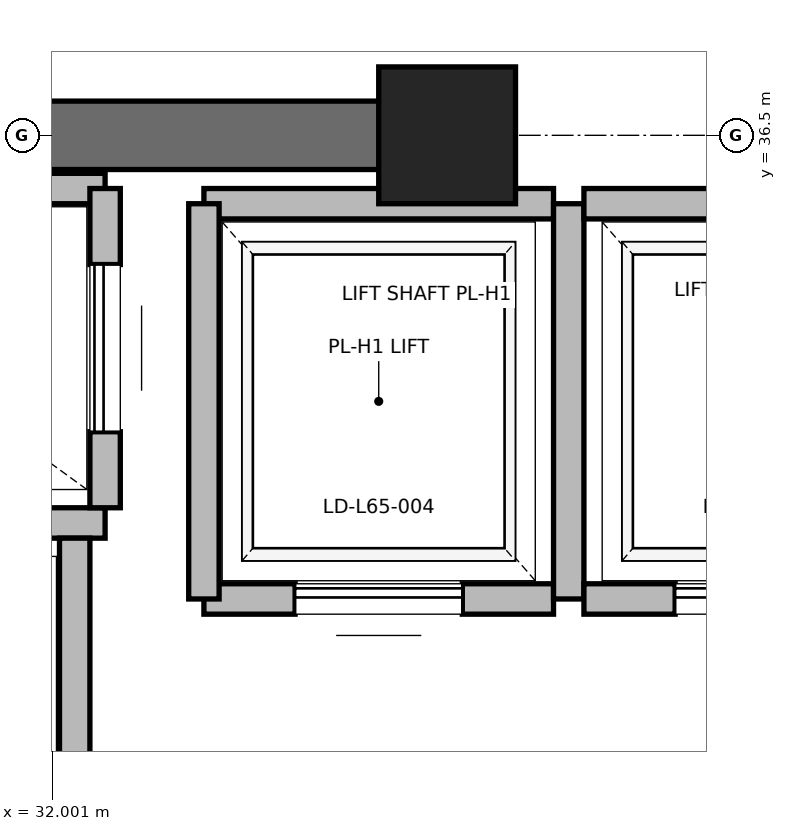
"""IFC4 building model, lengths in metres.
Left out: names, types, materials, properties, quantities, classifications, styles, units other than length and angle.
Written with IfcOpenShell. Run it as: python <this file> out.ifc"""

import sys

from ifc_helpers import new_model, si_unit, direction, frame, frame_2d, origin, origin_2d, place, context, subcontext, project, spatial, rectangle, extrude, element, fill, save


model = new_model("IFC4")
c1 = context("Model", 3, precision=1e-05, world=origin(), true_north=direction((0.0, 1.0)))
c2 = subcontext(c1, "Body", "Model", "MODEL_VIEW")
j1 = project(units=[si_unit("LENGTHUNIT", "METRE"), si_unit("PLANEANGLEUNIT", "RADIAN")], contexts=[c1])
p1 = place(None, origin())
s1 = spatial("IfcSite", under=j1, at=p1, CompositionType="ELEMENT")
p2 = place(p1, origin())
s2 = spatial("IfcBuilding", under=s1, at=p2, CompositionType="ELEMENT")
p3 = place(p2, frame((0.0, 0.0, 279.2)))
s3 = spatial("IfcBuildingStorey", under=s2, at=p3, CompositionType="ELEMENT", Elevation=279.2)
p4 = place(p3, frame((34.6, 36.5, 0.0), z_axis=(0.0, 0.0, 1.0), x_axis=(1.0, 0.0, 0.0)))
e1 = element("IfcColumn", 1, at=p4, inside=s3, PredefinedType="PILASTER", context=c2, shape_type="SweptSolid", body=[
    extrude(rectangle(XDim=0.9, YDim=0.9, at=origin_2d()), origin(), (0.0, 0.0, 1.0), 4.0),
])
p5 = place(p3, frame((29.0, 36.5, 0.0), z_axis=(0.0, 0.0, 1.0), x_axis=(1.0, 0.0, 0.0)))
e2 = element("IfcWall", 2, at=p5, inside=s3, PredefinedType="SHEAR", context=c2, shape_type="SweptSolid", body=[
    extrude(rectangle(XDim=5.8, YDim=0.45, at=frame_2d((2.9, 0.0))), origin(), (0.0, 0.0, 1.0), 3.785),
])
p6 = place(p3, frame((29.55, 33.95, 0.0), z_axis=(0.0, 0.0, 1.0), x_axis=(1.0, 0.0, 0.0)))
e3 = element("IfcWall", 3, at=p6, inside=s3, PredefinedType="SOLIDWALL", context=c2, shape_type="SweptSolid", body=[
    extrude(rectangle(XDim=2.8, YDim=0.2, at=frame_2d((1.4, 0.0))), origin(), (0.0, 0.0, 1.0), 3.785),
])
p7 = place(p3, frame((32.15, 30.85, 0.0), z_axis=(0.0, 0.0, 1.0), x_axis=(0.0, 1.0, 0.0)))
e4 = element("IfcWall", 4, at=p7, inside=s3, PredefinedType="SOLIDWALL", context=c2, shape_type="SweptSolid", body=[
    extrude(rectangle(XDim=3.0, YDim=0.2, at=frame_2d((1.5, 0.0))), origin(), (0.0, 0.0, 1.0), 3.785),
])
p8 = place(p3, frame((32.35, 36.15, 0.0), z_axis=(0.0, 0.0, 1.0), x_axis=(-1.0, 0.0, 0.0)))
e5 = element("IfcWall", 5, at=p8, inside=s3, PredefinedType="SOLIDWALL", context=c2, shape_type="SweptSolid", body=[
    extrude(rectangle(XDim=2.8, YDim=0.2, at=frame_2d((1.4, 0.0))), origin(), (0.0, 0.0, 1.0), 3.148),
])
p9 = place(p3, frame((32.35, 34.05, 0.0), z_axis=(0.0, 0.0, 1.0), x_axis=(0.0, 1.0, 0.0)))
e6 = element("IfcWall", 6, at=p9, inside=s3, PredefinedType="SOLIDWALL", context=c2, shape_type="SweptSolid", body=[
    extrude(rectangle(XDim=2.1, YDim=0.2, at=frame_2d((1.05, 0.0))), origin(), (0.0, 0.0, 1.0), 3.785),
])
p10 = place(p9, frame((0.5, 0.0, 0.0)))
e7 = element("IfcOpeningElement", 7, at=p10, cuts=e6, PredefinedType="OPENING", context=c2, shape_type="SweptSolid", body=[
    extrude(rectangle(XDim=1.1, YDim=2.2, at=frame_2d((0.55, 1.1))), frame((0.0, 0.1, 0.0), z_axis=(0.0, -1.0, 0.0), x_axis=(1.0, 0.0, 0.0)), (0.0, 0.0, 1.0), 0.2),
])
p11 = place(p3, frame((33.0, 33.45, 0.0), z_axis=(0.0, 0.0, 1.0), x_axis=(1.0, 0.0, 0.0)))
e8 = element("IfcWall", 8, at=p11, inside=s3, PredefinedType="SOLIDWALL", context=c2, shape_type="SweptSolid", body=[
    extrude(rectangle(XDim=2.3, YDim=0.2, at=frame_2d((1.15, 0.0))), origin(), (0.0, 0.0, 1.0), 3.785),
])
p12 = place(p11, frame((0.6, 0.0, 0.0)))
e9 = element("IfcOpeningElement", 9, at=p12, cuts=e8, PredefinedType="OPENING", context=c2, shape_type="SweptSolid", body=[
    extrude(rectangle(XDim=1.1, YDim=2.2, at=frame_2d((0.55, 1.1))), frame((0.0, 0.1, 0.0), z_axis=(0.0, -1.0, 0.0), x_axis=(1.0, 0.0, 0.0)), (0.0, 0.0, 1.0), 0.2),
])
p13 = place(p3, frame((35.3, 36.05, 0.0), z_axis=(0.0, 0.0, 1.0), x_axis=(-1.0, 0.0, 0.0)))
e10 = element("IfcWall", 10, at=p13, inside=s3, PredefinedType="SOLIDWALL", context=c2, shape_type="SweptSolid", body=[
    extrude(rectangle(XDim=2.3, YDim=0.2, at=frame_2d((1.15, 0.0))), origin(), (0.0, 0.0, 1.0), 2.865),
])
p14 = place(p3, frame((33.0, 36.05, 0.0), z_axis=(0.0, 0.0, 1.0), x_axis=(0.0, -1.0, 0.0)))
e11 = element("IfcWall", 11, at=p14, inside=s3, PredefinedType="SOLIDWALL", context=c2, shape_type="SweptSolid", body=[
    extrude(rectangle(XDim=2.6, YDim=0.2, at=frame_2d((1.3, 0.0))), origin(), (0.0, 0.0, 1.0), 3.785),
])
p15 = place(p3, frame((35.4, 33.45, 0.0), z_axis=(0.0, 0.0, 1.0), x_axis=(0.0, 1.0, 0.0)))
e12 = element("IfcWall", 12, at=p15, inside=s3, PredefinedType="SOLIDWALL", context=c2, shape_type="SweptSolid", body=[
    extrude(rectangle(XDim=2.6, YDim=0.2, at=frame_2d((1.3, 0.0))), origin(), (0.0, 0.0, 1.0), 2.865),
])
p16 = place(p3, frame((35.5, 33.45, 0.0), z_axis=(0.0, 0.0, 1.0), x_axis=(1.0, 0.0, 0.0)))
e13 = element("IfcWall", 13, at=p16, inside=s3, PredefinedType="SOLIDWALL", context=c2, shape_type="SweptSolid", body=[
    extrude(rectangle(XDim=2.3, YDim=0.2, at=frame_2d((1.15, 0.0))), origin(), (0.0, 0.0, 1.0), 3.785),
])
p17 = place(p16, frame((0.6, 0.0, 0.0)))
e14 = element("IfcOpeningElement", 14, at=p17, cuts=e13, PredefinedType="OPENING", context=c2, shape_type="SweptSolid", body=[
    extrude(rectangle(XDim=1.1, YDim=2.2, at=frame_2d((0.55, 1.1))), frame((0.0, 0.1, 0.0), z_axis=(0.0, -1.0, 0.0), x_axis=(1.0, 0.0, 0.0)), (0.0, 0.0, 1.0), 0.2),
])
p18 = place(p3, frame((37.8, 36.05, 0.0), z_axis=(0.0, 0.0, 1.0), x_axis=(-1.0, 0.0, 0.0)))
e15 = element("IfcWall", 15, at=p18, inside=s3, PredefinedType="SOLIDWALL", context=c2, shape_type="SweptSolid", body=[
    extrude(rectangle(XDim=2.3, YDim=0.2, at=frame_2d((1.15, 0.0))), origin(), (0.0, 0.0, 1.0), 2.865),
])
p19 = place(p10, origin())
e16 = element("IfcDoor", 16, at=p19, inside=s3, OperationType="SLIDING_TO_RIGHT", PredefinedType="DOOR", context=c2, shape_type="SweptSolid", body=[
    extrude(rectangle(XDim=1.1, YDim=2.2, at=frame_2d((0.55, 1.1))), frame((0.0, 0.025, 0.0), z_axis=(0.0, -1.0, 0.0), x_axis=(1.0, 0.0, 0.0)), (0.0, 0.0, 1.0), 0.05),
])
fill(e7, e16)
p20 = place(p12, origin())
e17 = element("IfcDoor", 17, at=p20, inside=s3, OperationType="SLIDING_TO_RIGHT", PredefinedType="DOOR", context=c2, shape_type="SweptSolid", body=[
    extrude(rectangle(XDim=1.1, YDim=2.2, at=frame_2d((0.55, 1.1))), frame((0.0, 0.025, 0.0), z_axis=(0.0, -1.0, 0.0), x_axis=(1.0, 0.0, 0.0)), (0.0, 0.0, 1.0), 0.05),
])
fill(e9, e17)
p21 = place(p17, origin())
e18 = element("IfcDoor", 18, at=p21, inside=s3, OperationType="SLIDING_TO_RIGHT", PredefinedType="DOOR", context=c2, shape_type="SweptSolid", body=[
    extrude(rectangle(XDim=1.1, YDim=2.2, at=frame_2d((0.55, 1.1))), frame((0.0, 0.025, 0.0), z_axis=(0.0, -1.0, 0.0), x_axis=(1.0, 0.0, 0.0)), (0.0, 0.0, 1.0), 0.05),
])
fill(e14, e18)
save(model, sys.argv[1])
